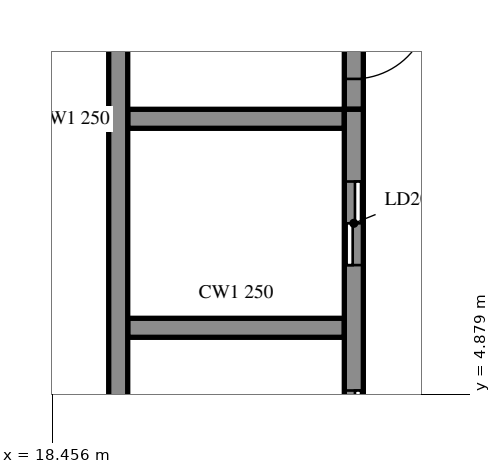
"""IFC4 building model, lengths in metres.
Left out: names, types, materials, properties, quantities, classifications, styles, units other than length and angle.
Written with IfcOpenShell. Run it as: python <this file> out.ifc"""

import sys

from ifc_helpers import new_model, si_unit, direction, frame, frame_2d, origin, place, context, subcontext, project, spatial, rectangle, extrude, element, fill, save


model = new_model("IFC4")
c1 = context("Model", 3, precision=1e-05, world=origin(), true_north=direction((0.0, 1.0)))
c2 = subcontext(c1, "Body", "Model", "MODEL_VIEW")
j1 = project(units=[si_unit("LENGTHUNIT", "METRE"), si_unit("PLANEANGLEUNIT", "RADIAN")], contexts=[c1])
p1 = place(None, origin())
s1 = spatial("IfcSite", under=j1, at=p1, CompositionType="ELEMENT")
p2 = place(p1, origin())
s2 = spatial("IfcBuilding", under=s1, at=p2, CompositionType="ELEMENT")
p3 = place(p2, frame((0.0, 0.0, 41.6)))
s3 = spatial("IfcBuildingStorey", under=s2, at=p3, CompositionType="ELEMENT", Elevation=41.6)
p4 = place(p3, frame((19.325, 15.125, 0.0), z_axis=(0.0, 0.0, 1.0), x_axis=(0.0, -1.0, 0.0)))
e1 = element("IfcWall", 1, at=p4, inside=s3, PredefinedType="SOLIDWALL", context=c2, shape_type="SweptSolid", body=[
    extrude(rectangle(XDim=24.25, YDim=0.25, at=frame_2d((12.125, 0.0))), origin(), (0.0, 0.0, 1.0), 4.06),
])
p5 = place(p3, frame((22.425, -8.875, 0.0), z_axis=(0.0, 0.0, 1.0), x_axis=(0.0, 1.0, 0.0)))
e2 = element("IfcWall", 2, at=p5, inside=s3, PredefinedType="SOLIDWALL", context=c2, shape_type="SweptSolid", body=[
    extrude(rectangle(XDim=17.5, YDim=0.25, at=frame_2d((8.75, 0.0))), origin(), (0.0, 0.0, 1.0), 4.06),
])
p6 = place(p5, frame((7.2, 0.0, 0.0)))
e3 = element("IfcOpeningElement", 3, at=p6, cuts=e2, PredefinedType="OPENING", context=c2, shape_type="SweptSolid", body=[
    extrude(rectangle(XDim=1.1, YDim=2.1, at=frame_2d((0.55, 1.05))), frame((0.0, 0.135, 0.0), z_axis=(0.0, -1.0, 0.0), x_axis=(1.0, 0.0, 0.0)), (0.0, 0.0, 1.0), 0.27),
])
p7 = place(p5, frame((9.95, 0.0, 0.0)))
e4 = element("IfcOpeningElement", 4, at=p7, cuts=e2, PredefinedType="OPENING", context=c2, shape_type="SweptSolid", body=[
    extrude(rectangle(XDim=1.1, YDim=2.1, at=frame_2d((0.55, 1.05))), frame((0.0, 0.135, 0.0), z_axis=(0.0, -1.0, 0.0), x_axis=(1.0, 0.0, 0.0)), (0.0, 0.0, 1.0), 0.27),
])
p8 = place(p5, frame((12.7, 0.0, 0.0)))
e5 = element("IfcOpeningElement", 5, at=p8, cuts=e2, PredefinedType="OPENING", context=c2, shape_type="SweptSolid", body=[
    extrude(rectangle(XDim=1.1, YDim=2.1, at=frame_2d((0.55, 1.05))), frame((0.0, 0.135, 0.0), z_axis=(0.0, -1.0, 0.0), x_axis=(1.0, 0.0, 0.0)), (0.0, 0.0, 1.0), 0.27),
])
p9 = place(p5, frame((15.45, 0.0, 0.0)))
e6 = element("IfcOpeningElement", 6, at=p9, cuts=e2, PredefinedType="OPENING", context=c2, shape_type="SweptSolid", body=[
    extrude(rectangle(XDim=1.1, YDim=2.1, at=frame_2d((0.55, 1.05))), frame((0.0, 0.135, 0.0), z_axis=(0.0, -1.0, 0.0), x_axis=(1.0, 0.0, 0.0)), (0.0, 0.0, 1.0), 0.27),
])
p10 = place(p5, frame((0.512, 0.0, 0.0)))
e7 = element("IfcOpeningElement", 7, at=p10, cuts=e2, PredefinedType="OPENING", context=c2, shape_type="SweptSolid", body=[
    extrude(rectangle(XDim=0.9, YDim=2.1, at=frame_2d((0.45, 1.05))), frame((0.0, 0.135, 0.0), z_axis=(0.0, -1.0, 0.0), x_axis=(1.0, 0.0, 0.0)), (0.0, 0.0, 1.0), 0.27),
])
p11 = place(p5, frame((3.587, 0.0, 0.0)))
e8 = element("IfcOpeningElement", 8, at=p11, cuts=e2, PredefinedType="OPENING", context=c2, shape_type="SweptSolid", body=[
    extrude(rectangle(XDim=0.9, YDim=2.1, at=frame_2d((0.45, 1.05))), frame((0.0, 0.135, 0.0), z_axis=(0.0, -1.0, 0.0), x_axis=(1.0, 0.0, 0.0)), (0.0, 0.0, 1.0), 0.27),
])
p12 = place(p3, frame((22.425, 14.875, 0.0), z_axis=(0.0, 0.0, 1.0), x_axis=(0.0, -1.0, 0.0)))
e9 = element("IfcWall", 9, at=p12, inside=s3, PredefinedType="SOLIDWALL", context=c2, shape_type="SweptSolid", body=[
    extrude(rectangle(XDim=6.25, YDim=0.25, at=frame_2d((3.125, 0.0))), origin(), (0.0, 0.0, 1.0), 4.06),
])
p13 = place(p12, frame((4.85, 0.0, 0.0)))
e10 = element("IfcOpeningElement", 10, at=p13, cuts=e9, PredefinedType="OPENING", context=c2, shape_type="SweptSolid", body=[
    extrude(rectangle(XDim=1.0, YDim=2.1, at=frame_2d((0.5, 1.05))), frame((0.0, 0.135, 0.0), z_axis=(0.0, -1.0, 0.0), x_axis=(1.0, 0.0, 0.0)), (0.0, 0.0, 1.0), 0.27),
])
for number, where, z_axis, x_axis in (
    (11, (19.45, 5.75, 0.0), (0.0, 0.0, 1.0), (1.0, 0.0, 0.0)),
    (12, (19.45, 8.5, 0.0), (0.0, 0.0, 1.0), (1.0, 0.0, 0.0)),
):
    element("IfcWall", number, at=place(p3, frame(where, z_axis=z_axis, x_axis=x_axis)), inside=s3, PredefinedType="SOLIDWALL", context=c2, shape_type="SweptSolid", body=[
        extrude(rectangle(XDim=2.85, YDim=0.25, at=frame_2d((1.425, 0.0))), origin(), (0.0, 0.0, 1.0), 4.06),
    ])
p14 = place(p8, origin())
e13 = element("IfcDoor", 13, at=p14, inside=s3, OperationType="DOUBLE_DOOR_SLIDING", PredefinedType="DOOR", context=c2, shape_type="SweptSolid", body=[
    extrude(rectangle(XDim=1.1, YDim=2.1, at=frame_2d((0.55, 1.05))), frame((0.0, 0.025, 0.0), z_axis=(0.0, -1.0, 0.0), x_axis=(1.0, 0.0, 0.0)), (0.0, 0.0, 1.0), 0.05),
])
fill(e5, e13)
p15 = place(p9, origin())
e14 = element("IfcDoor", 14, at=p15, inside=s3, OperationType="DOUBLE_DOOR_SLIDING", PredefinedType="DOOR", context=c2, shape_type="SweptSolid", body=[
    extrude(rectangle(XDim=1.1, YDim=2.1, at=frame_2d((0.55, 1.05))), frame((0.0, 0.025, 0.0), z_axis=(0.0, -1.0, 0.0), x_axis=(1.0, 0.0, 0.0)), (0.0, 0.0, 1.0), 0.05),
])
fill(e6, e14)
p16 = place(p13, origin())
e15 = element("IfcDoor", 15, at=p16, inside=s3, OperationType="SINGLE_SWING_RIGHT", PredefinedType="DOOR", context=c2, shape_type="SweptSolid", body=[
    extrude(rectangle(XDim=1.0, YDim=2.1, at=frame_2d((0.5, 1.05))), frame((0.0, 0.025, 0.0), z_axis=(0.0, -1.0, 0.0), x_axis=(1.0, 0.0, 0.0)), (0.0, 0.0, 1.0), 0.05),
])
fill(e10, e15)
save(model, sys.argv[1])
